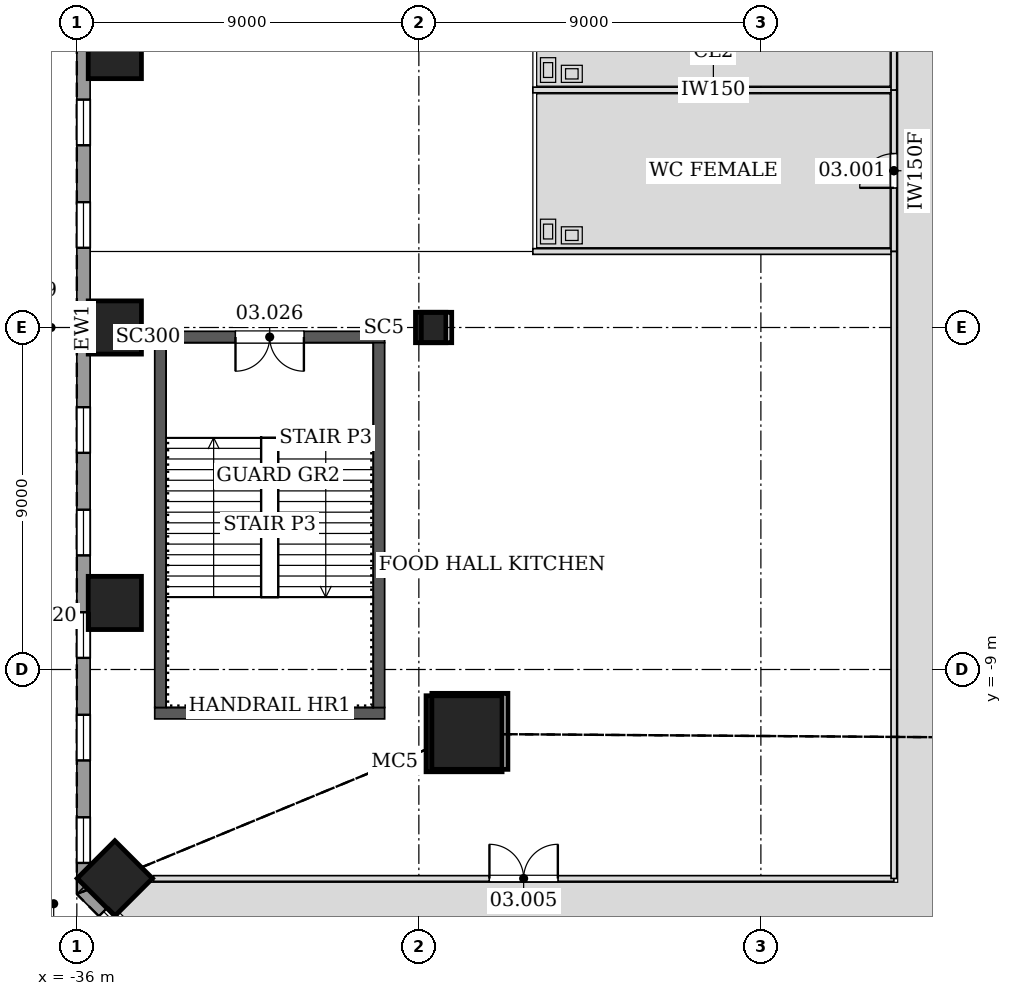
"""IFC4 building model, lengths in metres.
Left out: names, types, materials, properties, quantities, classifications, styles, units other than length and angle.
Written with IfcOpenShell. Run it as: python <this file> out.ifc"""

import sys

from ifc_helpers import new_model, si_unit, direction, frame, frame_2d, origin, origin_2d, place, context, subcontext, project, spatial, rectangle, hollow_rectangle, extrude, element, fill, save


model = new_model("IFC4")
c1 = context("Model", 3, precision=1e-05, world=origin(), true_north=direction((0.0, 1.0)))
c2 = subcontext(c1, "Body", "Model", "MODEL_VIEW")
j1 = project(units=[si_unit("LENGTHUNIT", "METRE"), si_unit("PLANEANGLEUNIT", "RADIAN")], contexts=[c1])
p1 = place(None, origin())
s1 = spatial("IfcSite", under=j1, at=p1, CompositionType="ELEMENT")
p2 = place(p1, origin())
s2 = spatial("IfcBuilding", under=s1, at=p2, CompositionType="ELEMENT")
p3 = place(p2, frame((0.0, 0.0, 18.6)))
s3 = spatial("IfcBuildingStorey", under=s2, at=p3, CompositionType="ELEMENT", Elevation=18.6)
p4 = place(p3, frame((-25.81, -10.691, 0.0), z_axis=(0.028289472832, 0.011704430453, 0.999531246152), x_axis=(-0.3823083337, 0.92403481427, 0.0)))
e1 = element("IfcColumn", 1, at=p4, inside=s3, PredefinedType="COLUMN", context=c2, shape_type="SweptSolid", body=[
    extrude(hollow_rectangle(XDim=2.0, YDim=2.0, WallThickness=0.09, at=origin_2d()), origin(), (0.0, 0.0, 1.0), 5.402),
])
p5 = place(p3, frame((-26.688, 0.0, 0.0), z_axis=(0.02824625291, 0.0, 0.999600994996), x_axis=(0.0, 1.0, 0.0)))
e2 = element("IfcColumn", 2, at=p5, inside=s3, PredefinedType="COLUMN", context=c2, shape_type="SweptSolid", body=[
    extrude(hollow_rectangle(XDim=0.8, YDim=0.8, WallThickness=0.05, at=origin_2d()), origin(), (0.0, 0.0, 1.0), 5.402),
])
for number, where, z_axis, x_axis in (
    (3, (-35.0, 7.249, 0.0), (0.0, 0.0, 1.0), (1.0, 0.0, 0.0)),
    (4, (-35.0, 0.0, 0.0), (0.0, 0.0, 1.0), (1.0, 0.0, 0.0)),
    (5, (-35.0, -7.249, 0.0), (0.0, 0.0, 1.0), (1.0, 0.0, 0.0)),
    (6, (-35.0, -14.498, 0.0), (0.0, 0.0, 1.0), (0.707, 0.707, 0.0)),
):
    element("IfcColumn", number, at=place(p3, frame(where, z_axis=z_axis, x_axis=x_axis)), inside=s3, PredefinedType="COLUMN", context=c2, shape_type="SweptSolid", body=[
        extrude(rectangle(XDim=1.4, YDim=1.4, at=origin_2d()), origin(), (0.0, 0.0, 1.0), 5.4),
    ])
p6 = place(p3, frame((-33.95, -10.15, 0.0), z_axis=(0.0, 0.0, 1.0), x_axis=(1.0, 0.0, 0.0)))
e7 = element("IfcWall", 7, at=p6, inside=s3, PredefinedType="SOLIDWALL", context=c2, shape_type="SweptSolid", body=[
    extrude(rectangle(XDim=6.05, YDim=0.3, at=frame_2d((3.025, 0.0))), origin(), (0.0, 0.0, 1.0), 5.4),
])
p7 = place(p3, frame((-27.9, -0.25, 0.0), z_axis=(0.0, 0.0, 1.0), x_axis=(-1.0, 0.0, 0.0)))
e8 = element("IfcWall", 8, at=p7, inside=s3, PredefinedType="SOLIDWALL", context=c2, shape_type="SweptSolid", body=[
    extrude(rectangle(XDim=6.05, YDim=0.3, at=frame_2d((3.025, 0.0))), origin(), (0.0, 0.0, 1.0), 5.4),
])
p8 = place(p7, frame((2.125, 0.0, 0.0)))
e9 = element("IfcOpeningElement", 9, at=p8, cuts=e8, PredefinedType="OPENING", context=c2, shape_type="SweptSolid", body=[
    extrude(rectangle(XDim=1.8, YDim=2.1, at=frame_2d((0.9, 1.05))), frame((0.0, 0.16, 0.0), z_axis=(0.0, -1.0, 0.0), x_axis=(1.0, 0.0, 0.0)), (0.0, 0.0, 1.0), 0.32),
])
p9 = place(p3, frame((-33.95, -0.25, 0.0), z_axis=(0.0, 0.0, 1.0), x_axis=(-1.0, 0.0, 0.0)))
e10 = element("IfcWall", 10, at=p9, inside=s3, PredefinedType="SOLIDWALL", context=c2, shape_type="SweptSolid", body=[
    extrude(rectangle(XDim=0.35, YDim=0.3, at=frame_2d((0.175, 0.0))), origin(), (0.0, 0.0, 1.0), 4.744),
])
for number, where, z_axis, x_axis in (
    (11, (-33.8, -0.4, 0.0), (0.0, 0.0, 1.0), (0.0, -1.0, 0.0)),
    (12, (-28.05, -10.0, 0.0), (0.0, 0.0, 1.0), (0.0, 1.0, 0.0)),
):
    element("IfcWall", number, at=place(p3, frame(where, z_axis=z_axis, x_axis=x_axis)), inside=s3, PredefinedType="SOLIDWALL", context=c2, shape_type="SweptSolid", body=[
        extrude(rectangle(XDim=9.6, YDim=0.3, at=frame_2d((4.8, 0.0))), origin(), (0.0, 0.0, 1.0), 5.4),
    ])
p10 = place(p3, frame((-35.825, 14.912, 0.0), z_axis=(0.0, 0.0, 1.0), x_axis=(0.0, -1.0, 0.0)))
e13 = element("IfcWall", 13, at=p10, inside=s3, PredefinedType="SOLIDWALL", context=c2, shape_type="SweptSolid", body=[
    extrude(rectangle(XDim=29.823, YDim=0.35, at=frame_2d((14.912, 0.0))), origin(), (0.0, 0.0, 1.0), 5.1),
])
p11 = place(p10, frame((0.822, 0.0, 0.9)))
e14 = element("IfcOpeningElement", 14, at=p11, cuts=e13, PredefinedType="OPENING", context=c2, shape_type="SweptSolid", body=[
    extrude(rectangle(XDim=1.2, YDim=3.6, at=frame_2d((0.6, 1.8))), frame((0.0, 0.185, 0.0), z_axis=(0.0, -1.0, 0.0), x_axis=(1.0, 0.0, 0.0)), (0.0, 0.0, 1.0), 0.37),
])
p12 = place(p10, frame((3.52, 0.0, 0.9)))
e15 = element("IfcOpeningElement", 15, at=p12, cuts=e13, PredefinedType="OPENING", context=c2, shape_type="SweptSolid", body=[
    extrude(rectangle(XDim=1.2, YDim=3.6, at=frame_2d((0.6, 1.8))), frame((0.0, 0.185, 0.0), z_axis=(0.0, -1.0, 0.0), x_axis=(1.0, 0.0, 0.0)), (0.0, 0.0, 1.0), 0.37),
])
p13 = place(p10, frame((6.218, 0.0, 0.9)))
e16 = element("IfcOpeningElement", 16, at=p13, cuts=e13, PredefinedType="OPENING", context=c2, shape_type="SweptSolid", body=[
    extrude(rectangle(XDim=1.2, YDim=3.6, at=frame_2d((0.6, 1.8))), frame((0.0, 0.185, 0.0), z_axis=(0.0, -1.0, 0.0), x_axis=(1.0, 0.0, 0.0)), (0.0, 0.0, 1.0), 0.37),
])
p14 = place(p10, frame((8.916, 0.0, 0.9)))
e17 = element("IfcOpeningElement", 17, at=p14, cuts=e13, PredefinedType="OPENING", context=c2, shape_type="SweptSolid", body=[
    extrude(rectangle(XDim=1.2, YDim=3.6, at=frame_2d((0.6, 1.8))), frame((0.0, 0.185, 0.0), z_axis=(0.0, -1.0, 0.0), x_axis=(1.0, 0.0, 0.0)), (0.0, 0.0, 1.0), 0.37),
])
p15 = place(p10, frame((11.614, 0.0, 0.9)))
e18 = element("IfcOpeningElement", 18, at=p15, cuts=e13, PredefinedType="OPENING", context=c2, shape_type="SweptSolid", body=[
    extrude(rectangle(XDim=1.2, YDim=3.6, at=frame_2d((0.6, 1.8))), frame((0.0, 0.185, 0.0), z_axis=(0.0, -1.0, 0.0), x_axis=(1.0, 0.0, 0.0)), (0.0, 0.0, 1.0), 0.37),
])
p16 = place(p10, frame((14.312, 0.0, 0.9)))
e19 = element("IfcOpeningElement", 19, at=p16, cuts=e13, PredefinedType="OPENING", context=c2, shape_type="SweptSolid", body=[
    extrude(rectangle(XDim=1.2, YDim=3.6, at=frame_2d((0.6, 1.8))), frame((0.0, 0.185, 0.0), z_axis=(0.0, -1.0, 0.0), x_axis=(1.0, 0.0, 0.0)), (0.0, 0.0, 1.0), 0.37),
])
p17 = place(p10, frame((17.01, 0.0, 0.9)))
e20 = element("IfcOpeningElement", 20, at=p17, cuts=e13, PredefinedType="OPENING", context=c2, shape_type="SweptSolid", body=[
    extrude(rectangle(XDim=1.2, YDim=3.6, at=frame_2d((0.6, 1.8))), frame((0.0, 0.185, 0.0), z_axis=(0.0, -1.0, 0.0), x_axis=(1.0, 0.0, 0.0)), (0.0, 0.0, 1.0), 0.37),
])
p18 = place(p10, frame((19.708, 0.0, 0.9)))
e21 = element("IfcOpeningElement", 21, at=p18, cuts=e13, PredefinedType="OPENING", context=c2, shape_type="SweptSolid", body=[
    extrude(rectangle(XDim=1.2, YDim=3.6, at=frame_2d((0.6, 1.8))), frame((0.0, 0.185, 0.0), z_axis=(0.0, -1.0, 0.0), x_axis=(1.0, 0.0, 0.0)), (0.0, 0.0, 1.0), 0.37),
])
p19 = place(p10, frame((22.406, 0.0, 0.9)))
e22 = element("IfcOpeningElement", 22, at=p19, cuts=e13, PredefinedType="OPENING", context=c2, shape_type="SweptSolid", body=[
    extrude(rectangle(XDim=1.2, YDim=3.6, at=frame_2d((0.6, 1.8))), frame((0.0, 0.185, 0.0), z_axis=(0.0, -1.0, 0.0), x_axis=(1.0, 0.0, 0.0)), (0.0, 0.0, 1.0), 0.37),
])
p20 = place(p10, frame((25.104, 0.0, 0.9)))
e23 = element("IfcOpeningElement", 23, at=p20, cuts=e13, PredefinedType="OPENING", context=c2, shape_type="SweptSolid", body=[
    extrude(rectangle(XDim=1.2, YDim=3.6, at=frame_2d((0.6, 1.8))), frame((0.0, 0.185, 0.0), z_axis=(0.0, -1.0, 0.0), x_axis=(1.0, 0.0, 0.0)), (0.0, 0.0, 1.0), 0.37),
])
p21 = place(p10, frame((27.802, 0.0, 0.9)))
e24 = element("IfcOpeningElement", 24, at=p21, cuts=e13, PredefinedType="OPENING", context=c2, shape_type="SweptSolid", body=[
    extrude(rectangle(XDim=1.2, YDim=3.6, at=frame_2d((0.6, 1.8))), frame((0.0, 0.185, 0.0), z_axis=(0.0, -1.0, 0.0), x_axis=(1.0, 0.0, 0.0)), (0.0, 0.0, 1.0), 0.37),
])
p22 = place(p3, frame((-35.876, -14.788, 0.0), z_axis=(0.0, 0.0, 1.0), x_axis=(0.707106781187, -0.707106781187, 0.0)))
e25 = element("IfcWall", 25, at=p22, inside=s3, PredefinedType="SOLIDWALL", context=c2, shape_type="SweptSolid", body=[
    extrude(rectangle(XDim=29.823, YDim=0.35, at=frame_2d((14.912, 0.0))), origin(), (0.0, 0.0, 1.0), 5.1),
])
p23 = place(p22, frame((0.822, 0.0, 0.9)))
e26 = element("IfcOpeningElement", 26, at=p23, cuts=e25, PredefinedType="OPENING", context=c2, shape_type="SweptSolid", body=[
    extrude(rectangle(XDim=1.2, YDim=3.6, at=frame_2d((0.6, 1.8))), frame((0.0, 0.185, 0.0), z_axis=(0.0, -1.0, 0.0), x_axis=(1.0, 0.0, 0.0)), (0.0, 0.0, 1.0), 0.37),
])
p24 = place(p22, frame((3.52, 0.0, 0.9)))
e27 = element("IfcOpeningElement", 27, at=p24, cuts=e25, PredefinedType="OPENING", context=c2, shape_type="SweptSolid", body=[
    extrude(rectangle(XDim=1.2, YDim=3.6, at=frame_2d((0.6, 1.8))), frame((0.0, 0.185, 0.0), z_axis=(0.0, -1.0, 0.0), x_axis=(1.0, 0.0, 0.0)), (0.0, 0.0, 1.0), 0.37),
])
p25 = place(p22, frame((6.218, 0.0, 0.9)))
e28 = element("IfcOpeningElement", 28, at=p25, cuts=e25, PredefinedType="OPENING", context=c2, shape_type="SweptSolid", body=[
    extrude(rectangle(XDim=1.2, YDim=3.6, at=frame_2d((0.6, 1.8))), frame((0.0, 0.185, 0.0), z_axis=(0.0, -1.0, 0.0), x_axis=(1.0, 0.0, 0.0)), (0.0, 0.0, 1.0), 0.37),
])
p26 = place(p22, frame((8.916, 0.0, 0.9)))
e29 = element("IfcOpeningElement", 29, at=p26, cuts=e25, PredefinedType="OPENING", context=c2, shape_type="SweptSolid", body=[
    extrude(rectangle(XDim=1.2, YDim=3.6, at=frame_2d((0.6, 1.8))), frame((0.0, 0.185, 0.0), z_axis=(0.0, -1.0, 0.0), x_axis=(1.0, 0.0, 0.0)), (0.0, 0.0, 1.0), 0.37),
])
p27 = place(p22, frame((11.614, 0.0, 0.9)))
e30 = element("IfcOpeningElement", 30, at=p27, cuts=e25, PredefinedType="OPENING", context=c2, shape_type="SweptSolid", body=[
    extrude(rectangle(XDim=1.2, YDim=3.6, at=frame_2d((0.6, 1.8))), frame((0.0, 0.185, 0.0), z_axis=(0.0, -1.0, 0.0), x_axis=(1.0, 0.0, 0.0)), (0.0, 0.0, 1.0), 0.37),
])
p28 = place(p22, frame((14.312, 0.0, 0.9)))
e31 = element("IfcOpeningElement", 31, at=p28, cuts=e25, PredefinedType="OPENING", context=c2, shape_type="SweptSolid", body=[
    extrude(rectangle(XDim=1.2, YDim=3.6, at=frame_2d((0.6, 1.8))), frame((0.0, 0.185, 0.0), z_axis=(0.0, -1.0, 0.0), x_axis=(1.0, 0.0, 0.0)), (0.0, 0.0, 1.0), 0.37),
])
p29 = place(p22, frame((17.01, 0.0, 0.9)))
e32 = element("IfcOpeningElement", 32, at=p29, cuts=e25, PredefinedType="OPENING", context=c2, shape_type="SweptSolid", body=[
    extrude(rectangle(XDim=1.2, YDim=3.6, at=frame_2d((0.6, 1.8))), frame((0.0, 0.185, 0.0), z_axis=(0.0, -1.0, 0.0), x_axis=(1.0, 0.0, 0.0)), (0.0, 0.0, 1.0), 0.37),
])
p30 = place(p22, frame((19.708, 0.0, 0.9)))
e33 = element("IfcOpeningElement", 33, at=p30, cuts=e25, PredefinedType="OPENING", context=c2, shape_type="SweptSolid", body=[
    extrude(rectangle(XDim=1.2, YDim=3.6, at=frame_2d((0.6, 1.8))), frame((0.0, 0.185, 0.0), z_axis=(0.0, -1.0, 0.0), x_axis=(1.0, 0.0, 0.0)), (0.0, 0.0, 1.0), 0.37),
])
p31 = place(p22, frame((22.406, 0.0, 0.9)))
e34 = element("IfcOpeningElement", 34, at=p31, cuts=e25, PredefinedType="OPENING", context=c2, shape_type="SweptSolid", body=[
    extrude(rectangle(XDim=1.2, YDim=3.6, at=frame_2d((0.6, 1.8))), frame((0.0, 0.185, 0.0), z_axis=(0.0, -1.0, 0.0), x_axis=(1.0, 0.0, 0.0)), (0.0, 0.0, 1.0), 0.37),
])
p32 = place(p22, frame((25.104, 0.0, 0.9)))
e35 = element("IfcOpeningElement", 35, at=p32, cuts=e25, PredefinedType="OPENING", context=c2, shape_type="SweptSolid", body=[
    extrude(rectangle(XDim=1.2, YDim=3.6, at=frame_2d((0.6, 1.8))), frame((0.0, 0.185, 0.0), z_axis=(0.0, -1.0, 0.0), x_axis=(1.0, 0.0, 0.0)), (0.0, 0.0, 1.0), 0.37),
])
p33 = place(p22, frame((27.802, 0.0, 0.9)))
e36 = element("IfcOpeningElement", 36, at=p33, cuts=e25, PredefinedType="OPENING", context=c2, shape_type="SweptSolid", body=[
    extrude(rectangle(XDim=1.2, YDim=3.6, at=frame_2d((0.6, 1.8))), frame((0.0, 0.185, 0.0), z_axis=(0.0, -1.0, 0.0), x_axis=(1.0, 0.0, 0.0)), (0.0, 0.0, 1.0), 0.37),
])
for number, where, z_axis, x_axis in (
    (37, (-14.5, 6.25, 0.0), (0.0, 0.0, 1.0), (-1.0, 0.0, 0.0)),
    (38, (-24.0, 2.0, 0.0), (0.0, 0.0, 1.0), (1.0, 0.0, 0.0)),
):
    element("IfcWall", number, at=place(p3, frame(where, z_axis=z_axis, x_axis=x_axis)), inside=s3, PredefinedType="PARTITIONING", context=c2, shape_type="SweptSolid", body=[
        extrude(rectangle(XDim=9.5, YDim=0.15, at=frame_2d((4.75, 0.0))), origin(), (0.0, 0.0, 1.0), 4.244),
    ])
p34 = place(p3, frame((-14.5, 2.0, 0.0), z_axis=(0.0, 0.0, 1.0), x_axis=(0.0, 1.0, 0.0)))
e39 = element("IfcWall", 39, at=p34, inside=s3, PredefinedType="PARTITIONING", context=c2, shape_type="SweptSolid", body=[
    extrude(rectangle(XDim=4.25, YDim=0.15, at=frame_2d((2.125, 0.0))), origin(), (0.0, 0.0, 1.0), 5.1),
])
p35 = place(p34, frame((1.675, 0.0, 0.0)))
e40 = element("IfcOpeningElement", 40, at=p35, cuts=e39, PredefinedType="OPENING", context=c2, shape_type="SweptSolid", body=[
    extrude(rectangle(XDim=0.9, YDim=2.1, at=frame_2d((0.45, 1.05))), frame((0.0, 0.085, 0.0), z_axis=(0.0, -1.0, 0.0), x_axis=(1.0, 0.0, 0.0)), (0.0, 0.0, 1.0), 0.17),
])
p36 = place(p3, frame((-14.5, 6.25, 0.0), z_axis=(0.0, 0.0, 1.0), x_axis=(0.0, 1.0, 0.0)))
e41 = element("IfcWall", 41, at=p36, inside=s3, PredefinedType="PARTITIONING", context=c2, shape_type="SweptSolid", body=[
    extrude(rectangle(XDim=6.45, YDim=0.15, at=frame_2d((3.225, 0.0))), origin(), (0.0, 0.0, 1.0), 3.79),
])
p37 = place(p36, frame((1.675, 0.0, 0.0)))
e42 = element("IfcOpeningElement", 42, at=p37, cuts=e41, PredefinedType="OPENING", context=c2, shape_type="SweptSolid", body=[
    extrude(rectangle(XDim=0.9, YDim=2.1, at=frame_2d((0.45, 1.05))), frame((0.0, 0.085, 0.0), z_axis=(0.0, -1.0, 0.0), x_axis=(1.0, 0.0, 0.0)), (0.0, 0.0, 1.0), 0.17),
])
p38 = place(p36, frame((4.85, 0.0, 0.0)))
e43 = element("IfcOpeningElement", 43, at=p38, cuts=e41, PredefinedType="OPENING", context=c2, shape_type="SweptSolid", body=[
    extrude(rectangle(XDim=1.0, YDim=2.1, at=frame_2d((0.5, 1.05))), frame((0.0, 0.085, 0.0), z_axis=(0.0, -1.0, 0.0), x_axis=(1.0, 0.0, 0.0)), (0.0, 0.0, 1.0), 0.17),
])
p39 = place(p3, frame((-33.986, -14.5, 0.0), z_axis=(0.0, 0.0, 1.0), x_axis=(1.0, 0.0, 0.0)))
e44 = element("IfcWall", 44, at=p39, inside=s3, PredefinedType="PARTITIONING", context=c2, shape_type="SweptSolid", body=[
    extrude(rectangle(XDim=19.486, YDim=0.15, at=frame_2d((9.743, 0.0))), origin(), (0.0, 0.0, 1.0), 4.13),
])
p40 = place(p39, frame((8.843, 0.0, 0.0)))
e45 = element("IfcOpeningElement", 45, at=p40, cuts=e44, PredefinedType="OPENING", context=c2, shape_type="SweptSolid", body=[
    extrude(rectangle(XDim=1.8, YDim=2.4, at=frame_2d((0.9, 1.2))), frame((0.0, 0.085, 0.0), z_axis=(0.0, -1.0, 0.0), x_axis=(1.0, 0.0, 0.0)), (0.0, 0.0, 1.0), 0.17),
])
p41 = place(p3, frame((-14.5, -14.5, 0.0), z_axis=(0.0, 0.0, 1.0), x_axis=(0.0, 1.0, 0.0)))
e46 = element("IfcWall", 46, at=p41, inside=s3, PredefinedType="PARTITIONING", context=c2, shape_type="SweptSolid", body=[
    extrude(rectangle(XDim=16.5, YDim=0.15, at=frame_2d((8.25, 0.0))), origin(), (0.0, 0.0, 1.0), 3.79),
])
p42 = place(p14, origin())
e47 = element("IfcWindow", 47, at=p42, inside=s3, PartitioningType="SINGLE_PANEL", PredefinedType="WINDOW", context=c2, shape_type="SweptSolid", body=[
    extrude(rectangle(XDim=1.2, YDim=3.6, at=frame_2d((0.6, 1.8))), frame((0.0, 0.03, 0.0), z_axis=(0.0, -1.0, 0.0), x_axis=(1.0, 0.0, 0.0)), (0.0, 0.0, 1.0), 0.06),
])
fill(e17, e47)
p43 = place(p15, origin())
e48 = element("IfcWindow", 48, at=p43, inside=s3, PartitioningType="SINGLE_PANEL", PredefinedType="WINDOW", context=c2, shape_type="SweptSolid", body=[
    extrude(rectangle(XDim=1.2, YDim=3.6, at=frame_2d((0.6, 1.8))), frame((0.0, 0.03, 0.0), z_axis=(0.0, -1.0, 0.0), x_axis=(1.0, 0.0, 0.0)), (0.0, 0.0, 1.0), 0.06),
])
fill(e18, e48)
p44 = place(p16, origin())
e49 = element("IfcWindow", 49, at=p44, inside=s3, PartitioningType="SINGLE_PANEL", PredefinedType="WINDOW", context=c2, shape_type="SweptSolid", body=[
    extrude(rectangle(XDim=1.2, YDim=3.6, at=frame_2d((0.6, 1.8))), frame((0.0, 0.03, 0.0), z_axis=(0.0, -1.0, 0.0), x_axis=(1.0, 0.0, 0.0)), (0.0, 0.0, 1.0), 0.06),
])
fill(e19, e49)
p45 = place(p17, origin())
e50 = element("IfcWindow", 50, at=p45, inside=s3, PartitioningType="SINGLE_PANEL", PredefinedType="WINDOW", context=c2, shape_type="SweptSolid", body=[
    extrude(rectangle(XDim=1.2, YDim=3.6, at=frame_2d((0.6, 1.8))), frame((0.0, 0.03, 0.0), z_axis=(0.0, -1.0, 0.0), x_axis=(1.0, 0.0, 0.0)), (0.0, 0.0, 1.0), 0.06),
])
fill(e20, e50)
p46 = place(p18, origin())
e51 = element("IfcWindow", 51, at=p46, inside=s3, PartitioningType="SINGLE_PANEL", PredefinedType="WINDOW", context=c2, shape_type="SweptSolid", body=[
    extrude(rectangle(XDim=1.2, YDim=3.6, at=frame_2d((0.6, 1.8))), frame((0.0, 0.03, 0.0), z_axis=(0.0, -1.0, 0.0), x_axis=(1.0, 0.0, 0.0)), (0.0, 0.0, 1.0), 0.06),
])
fill(e21, e51)
p47 = place(p19, origin())
e52 = element("IfcWindow", 52, at=p47, inside=s3, PartitioningType="SINGLE_PANEL", PredefinedType="WINDOW", context=c2, shape_type="SweptSolid", body=[
    extrude(rectangle(XDim=1.2, YDim=3.6, at=frame_2d((0.6, 1.8))), frame((0.0, 0.03, 0.0), z_axis=(0.0, -1.0, 0.0), x_axis=(1.0, 0.0, 0.0)), (0.0, 0.0, 1.0), 0.06),
])
fill(e22, e52)
p48 = place(p20, origin())
e53 = element("IfcWindow", 53, at=p48, inside=s3, PartitioningType="SINGLE_PANEL", PredefinedType="WINDOW", context=c2, shape_type="SweptSolid", body=[
    extrude(rectangle(XDim=1.2, YDim=3.6, at=frame_2d((0.6, 1.8))), frame((0.0, 0.03, 0.0), z_axis=(0.0, -1.0, 0.0), x_axis=(1.0, 0.0, 0.0)), (0.0, 0.0, 1.0), 0.06),
])
fill(e23, e53)
p49 = place(p21, origin())
e54 = element("IfcWindow", 54, at=p49, inside=s3, PartitioningType="SINGLE_PANEL", PredefinedType="WINDOW", context=c2, shape_type="SweptSolid", body=[
    extrude(rectangle(XDim=1.2, YDim=3.6, at=frame_2d((0.6, 1.8))), frame((0.0, 0.03, 0.0), z_axis=(0.0, -1.0, 0.0), x_axis=(1.0, 0.0, 0.0)), (0.0, 0.0, 1.0), 0.06),
])
fill(e24, e54)
p50 = place(p23, origin())
e55 = element("IfcWindow", 55, at=p50, inside=s3, PartitioningType="SINGLE_PANEL", PredefinedType="WINDOW", context=c2, shape_type="SweptSolid", body=[
    extrude(rectangle(XDim=1.2, YDim=3.6, at=frame_2d((0.6, 1.8))), frame((0.0, 0.03, 0.0), z_axis=(0.0, -1.0, 0.0), x_axis=(1.0, 0.0, 0.0)), (0.0, 0.0, 1.0), 0.06),
])
fill(e26, e55)
p51 = place(p35, origin())
e56 = element("IfcDoor", 56, at=p51, inside=s3, OperationType="SINGLE_SWING_LEFT", PredefinedType="DOOR", context=c2, shape_type="SweptSolid", body=[
    extrude(rectangle(XDim=0.9, YDim=2.1, at=frame_2d((0.45, 1.05))), frame((0.0, 0.025, 0.0), z_axis=(0.0, -1.0, 0.0), x_axis=(1.0, 0.0, 0.0)), (0.0, 0.0, 1.0), 0.05),
])
fill(e40, e56)
p52 = place(p40, origin())
e57 = element("IfcDoor", 57, at=p52, inside=s3, OperationType="DOUBLE_DOOR_SINGLE_SWING", PredefinedType="DOOR", context=c2, shape_type="SweptSolid", body=[
    extrude(rectangle(XDim=1.8, YDim=2.4, at=frame_2d((0.9, 1.2))), frame((0.0, 0.025, 0.0), z_axis=(0.0, -1.0, 0.0), x_axis=(1.0, 0.0, 0.0)), (0.0, 0.0, 1.0), 0.05),
])
fill(e45, e57)
p53 = place(p8, origin())
e58 = element("IfcDoor", 58, at=p53, inside=s3, OperationType="DOUBLE_DOOR_SINGLE_SWING", PredefinedType="DOOR", context=c2, shape_type="SweptSolid", body=[
    extrude(rectangle(XDim=1.8, YDim=2.1, at=frame_2d((0.9, 1.05))), frame((0.0, 0.025, 0.0), z_axis=(0.0, -1.0, 0.0), x_axis=(1.0, 0.0, 0.0)), (0.0, 0.0, 1.0), 0.05),
])
fill(e9, e58)
save(model, sys.argv[1])
